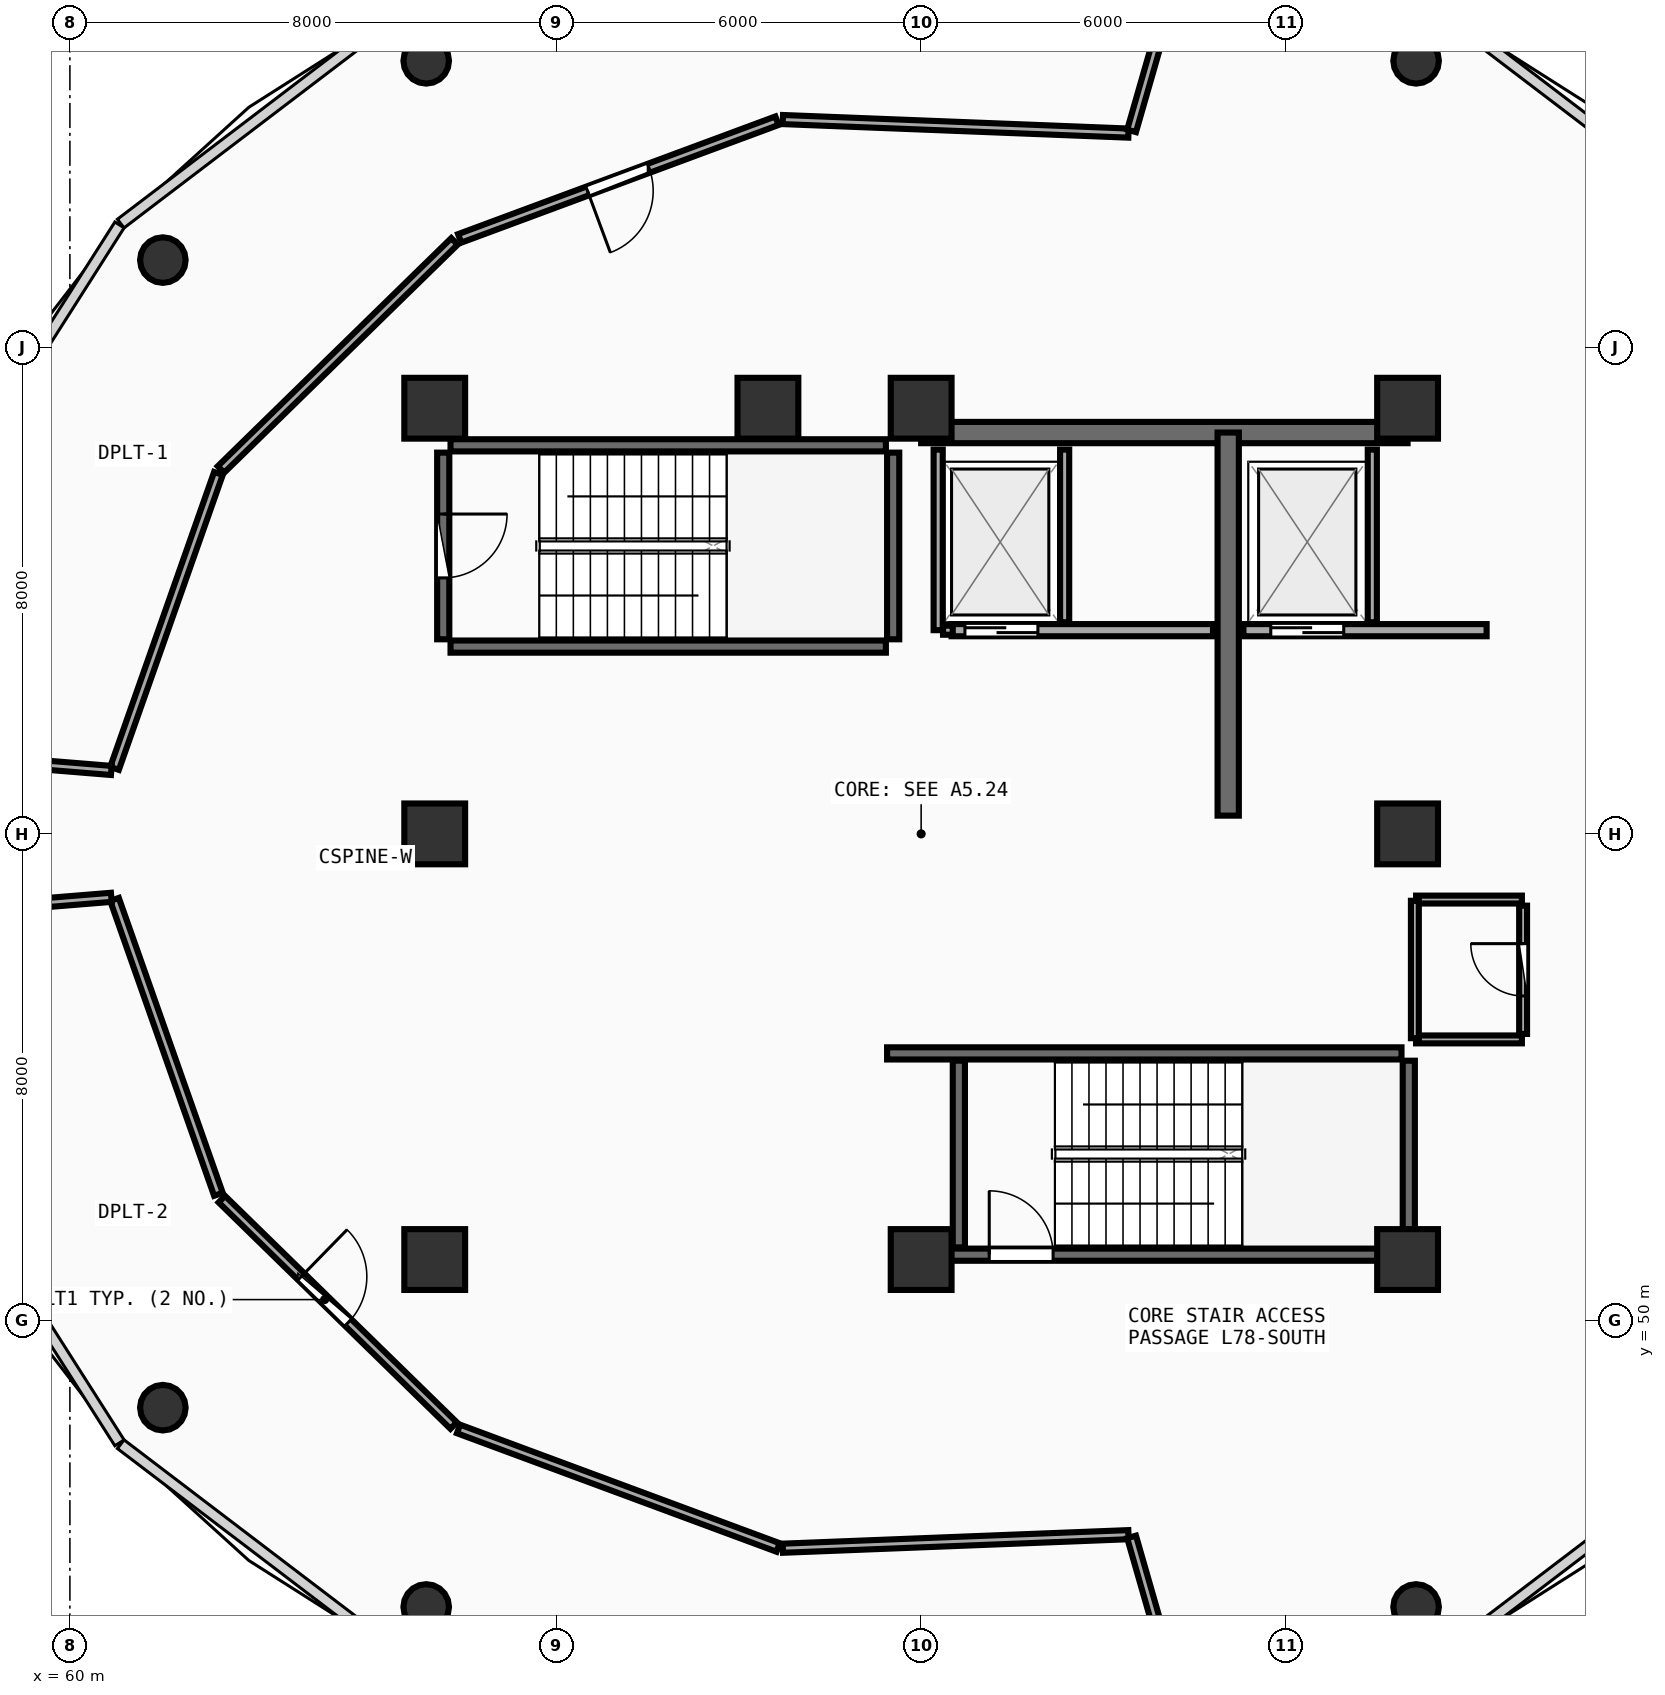
"""IFC4 building model, lengths in metres.
Left out: names, types, materials, properties, quantities, classifications, styles, units other than length and angle.
Written with IfcOpenShell. Run it as: python <this file> out.ifc"""

import sys

from ifc_helpers import new_model, si_unit, direction, frame, frame_2d, origin, origin_2d, place, context, subcontext, project, spatial, rectangle, circle, extrude, element, fill, save


model = new_model("IFC4")
c1 = context("Model", 3, precision=1e-05, world=origin(), true_north=direction((0.0, 1.0)))
c2 = subcontext(c1, "Body", "Model", "MODEL_VIEW")
j1 = project(units=[si_unit("LENGTHUNIT", "METRE"), si_unit("PLANEANGLEUNIT", "RADIAN")], contexts=[c1])
p1 = place(None, origin())
s1 = spatial("IfcSite", under=j1, at=p1, CompositionType="ELEMENT")
p2 = place(p1, origin())
s2 = spatial("IfcBuilding", under=s1, at=p2, CompositionType="ELEMENT")
p3 = place(p2, frame((0.0, 0.0, 306.9)))
s3 = spatial("IfcBuildingStorey", under=s2, at=p3, CompositionType="ELEMENT", Elevation=306.9)
for number, where, z_axis, x_axis in (
    (1, (66.0, 51.0, 0.0), (0.0, 0.0, 1.0), (1.0, 0.0, 0.0)),
    (2, (74.0, 51.0, 0.0), (0.0, 0.0, 1.0), (1.0, 0.0, 0.0)),
    (3, (82.0, 51.0, 0.0), (0.0, 0.0, 1.0), (1.0, 0.0, 0.0)),
    (4, (82.0, 58.0, 0.0), (0.0, 0.0, 1.0), (1.0, 0.0, 0.0)),
    (5, (82.0, 65.0, 0.0), (0.0, 0.0, 1.0), (1.0, 0.0, 0.0)),
    (6, (74.0, 65.0, 0.0), (0.0, 0.0, 1.0), (1.0, 0.0, 0.0)),
    (7, (71.48, 65.0, 0.0), (0.0, 0.0, 1.0), (1.0, 0.0, 0.0)),
    (8, (66.0, 65.0, 0.0), (0.0, 0.0, 1.0), (1.0, 0.0, 0.0)),
    (9, (66.0, 58.0, 0.0), (0.0, 0.0, 1.0), (1.0, 0.0, 0.0)),
):
    element("IfcColumn", number, at=place(p3, frame(where, z_axis=z_axis, x_axis=x_axis)), inside=s3, PredefinedType="PILASTER", context=c2, shape_type="SweptSolid", body=[
        extrude(rectangle(XDim=1.0, YDim=1.0, at=origin_2d()), origin(), (0.0, 0.0, 1.0), 4.2),
    ])
for number, where, z_axis, x_axis in (
    (10, (82.14, 70.713, 0.0), (0.0, 0.0, 1.0), (1.0, 0.0, 0.0)),
    (11, (65.86, 70.713, 0.0), (0.0, 0.0, 1.0), (1.0, 0.0, 0.0)),
    (12, (61.529, 67.436, 0.0), (0.0, 0.0, 1.0), (1.0, 0.0, 0.0)),
    (13, (61.529, 48.564, 0.0), (0.0, 0.0, 1.0), (1.0, 0.0, 0.0)),
    (14, (65.86, 45.287, 0.0), (0.0, 0.0, 1.0), (1.0, 0.0, 0.0)),
    (15, (82.14, 45.287, 0.0), (0.0, 0.0, 1.0), (1.0, 0.0, 0.0)),
):
    element("IfcColumn", number, at=place(p3, frame(where, z_axis=z_axis, x_axis=x_axis)), inside=s3, PredefinedType="COLUMN", context=c2, shape_type="SweptSolid", body=[
        extrude(circle(Radius=0.375, at=origin_2d()), origin(), (0.0, 0.0, 1.0), 4.2),
    ])
p4 = place(p3, frame((66.26, 61.08, 0.0), z_axis=(0.0, 0.0, 1.0), x_axis=(1.0, 0.0, 0.0)))
e16 = element("IfcWall", 16, at=p4, inside=s3, PredefinedType="SHEAR", context=c2, shape_type="SweptSolid", body=[
    extrude(rectangle(XDim=7.16, YDim=0.2, at=frame_2d((3.58, 0.0))), origin(), (0.0, 0.0, 1.0), 3.92),
])
p5 = place(p3, frame((73.54, 61.2, 0.0), z_axis=(0.0, 0.0, 1.0), x_axis=(0.0, 1.0, 0.0)))
e17 = element("IfcWall", 17, at=p5, inside=s3, PredefinedType="SHEAR", context=c2, shape_type="SweptSolid", body=[
    extrude(rectangle(XDim=3.07, YDim=0.2, at=frame_2d((1.535, 0.0))), origin(), (0.0, 0.0, 1.0), 3.92),
])
p6 = place(p3, frame((73.42, 64.39, 0.0), z_axis=(0.0, 0.0, 1.0), x_axis=(-1.0, 0.0, 0.0)))
e18 = element("IfcWall", 18, at=p6, inside=s3, PredefinedType="SHEAR", context=c2, shape_type="SweptSolid", body=[
    extrude(rectangle(XDim=7.16, YDim=0.2, at=frame_2d((3.58, 0.0))), origin(), (0.0, 0.0, 1.0), 3.92),
])
p7 = place(p3, frame((66.14, 64.27, 0.0), z_axis=(0.0, 0.0, 1.0), x_axis=(0.0, -1.0, 0.0)))
e19 = element("IfcWall", 19, at=p7, inside=s3, PredefinedType="SHEAR", context=c2, shape_type="SweptSolid", body=[
    extrude(rectangle(XDim=3.07, YDim=0.2, at=frame_2d((1.535, 0.0))), origin(), (0.0, 0.0, 1.0), 3.92),
])
p8 = place(p7, frame((1.01, 0.0, 0.0)))
e20 = element("IfcOpeningElement", 20, at=p8, cuts=e19, PredefinedType="OPENING", context=c2, shape_type="SweptSolid", body=[
    extrude(rectangle(XDim=1.05, YDim=2.1, at=frame_2d((0.525, 1.05))), frame((0.0, 0.11, 0.0), z_axis=(0.0, -1.0, 0.0), x_axis=(1.0, 0.0, 0.0)), (0.0, 0.0, 1.0), 0.22),
])
p9 = place(p3, frame((74.0, 51.08, 0.0), z_axis=(0.0, 0.0, 1.0), x_axis=(1.0, 0.0, 0.0)))
e21 = element("IfcWall", 21, at=p9, inside=s3, PredefinedType="SHEAR", context=c2, shape_type="SweptSolid", body=[
    extrude(rectangle(XDim=7.9, YDim=0.2, at=frame_2d((3.95, 0.0))), origin(), (0.0, 0.0, 1.0), 3.92),
])
p10 = place(p9, frame((1.12, 0.0, 0.0)))
e22 = element("IfcOpeningElement", 22, at=p10, cuts=e21, PredefinedType="OPENING", context=c2, shape_type="SweptSolid", body=[
    extrude(rectangle(XDim=1.05, YDim=2.1, at=frame_2d((0.525, 1.05))), frame((0.0, 0.11, 0.0), z_axis=(0.0, -1.0, 0.0), x_axis=(1.0, 0.0, 0.0)), (0.0, 0.0, 1.0), 0.22),
])
p11 = place(p3, frame((82.02, 51.2, 0.0), z_axis=(0.0, 0.0, 1.0), x_axis=(0.0, 1.0, 0.0)))
e23 = element("IfcWall", 23, at=p11, inside=s3, PredefinedType="SHEAR", context=c2, shape_type="SweptSolid", body=[
    extrude(rectangle(XDim=3.07, YDim=0.2, at=frame_2d((1.535, 0.0))), origin(), (0.0, 0.0, 1.0), 3.92),
])
p12 = place(p3, frame((81.9, 54.39, 0.0), z_axis=(0.0, 0.0, 1.0), x_axis=(-1.0, 0.0, 0.0)))
e24 = element("IfcWall", 24, at=p12, inside=s3, PredefinedType="SHEAR", context=c2, shape_type="SweptSolid", body=[
    extrude(rectangle(XDim=8.46, YDim=0.2, at=frame_2d((4.23, 0.0))), origin(), (0.0, 0.0, 1.0), 3.92),
])
p13 = place(p3, frame((74.62, 54.27, 0.0), z_axis=(0.0, 0.0, 1.0), x_axis=(0.0, -1.0, 0.0)))
e25 = element("IfcWall", 25, at=p13, inside=s3, PredefinedType="SHEAR", context=c2, shape_type="SweptSolid", body=[
    extrude(rectangle(XDim=3.07, YDim=0.2, at=frame_2d((1.535, 0.0))), origin(), (0.0, 0.0, 1.0), 3.92),
])
p14 = place(p3, frame((74.0, 64.6, 0.0), z_axis=(0.0, 0.0, 1.0), x_axis=(1.0, 0.0, 0.0)))
e26 = element("IfcWall", 26, at=p14, inside=s3, PredefinedType="SHEAR", context=c2, shape_type="SweptSolid", body=[
    extrude(rectangle(XDim=8.0, YDim=0.35, at=frame_2d((4.0, 0.0))), origin(), (0.0, 0.0, 1.0), 3.98),
])
p15 = place(p3, frame((79.05, 58.3, 0.0), z_axis=(0.0, 0.0, 1.0), x_axis=(0.0, 1.0, 0.0)))
e27 = element("IfcWall", 27, at=p15, inside=s3, PredefinedType="SHEAR", context=c2, shape_type="SweptSolid", body=[
    extrude(rectangle(XDim=6.3, YDim=0.35, at=frame_2d((3.15, 0.0))), origin(), (0.0, 0.0, 1.0), 3.98),
])
p16 = place(p3, frame((74.5, 61.35, 0.0), z_axis=(0.0, 0.0, 1.0), x_axis=(1.0, 0.0, 0.0)))
e28 = element("IfcWall", 28, at=p16, inside=s3, PredefinedType="SOLIDWALL", context=c2, shape_type="SweptSolid", body=[
    extrude(rectangle(XDim=4.3, YDim=0.2, at=frame_2d((2.15, 0.0))), origin(), (0.0, 0.0, 1.0), 3.97),
])
p17 = place(p16, frame((0.22, 0.0, 0.0)))
e29 = element("IfcOpeningElement", 29, at=p17, cuts=e28, PredefinedType="OPENING", context=c2, shape_type="SweptSolid", body=[
    extrude(rectangle(XDim=1.2, YDim=2.15, at=frame_2d((0.6, 1.075))), frame((0.0, 0.11, 0.0), z_axis=(0.0, -1.0, 0.0), x_axis=(1.0, 0.0, 0.0)), (0.0, 0.0, 1.0), 0.22),
])
p18 = place(p3, frame((74.28, 61.35, 0.0), z_axis=(0.0, 0.0, 1.0), x_axis=(0.0, 1.0, 0.0)))
e30 = element("IfcWall", 30, at=p18, inside=s3, PredefinedType="PARTITIONING", context=c2, shape_type="SweptSolid", body=[
    extrude(rectangle(XDim=2.97, YDim=0.15, at=frame_2d((1.485, 0.0))), origin(), (0.0, 0.0, 1.0), 1.365),
])
p19 = place(p3, frame((74.36, 61.35, 0.0), z_axis=(0.0, 0.0, 1.0), x_axis=(1.0, 0.0, 0.0)))
e31 = element("IfcWall", 31, at=p19, inside=s3, PredefinedType="PARTITIONING", context=c2, shape_type="SweptSolid", body=[
    extrude(rectangle(XDim=0.16, YDim=0.15, at=frame_2d((0.08, 0.0))), origin(), (0.0, 0.0, 1.0), 1.365),
])
p20 = place(p3, frame((76.36, 61.48, 0.0), z_axis=(0.0, 0.0, 1.0), x_axis=(0.0, 1.0, 0.0)))
e32 = element("IfcWall", 32, at=p20, inside=s3, PredefinedType="PARTITIONING", context=c2, shape_type="SweptSolid", body=[
    extrude(rectangle(XDim=2.84, YDim=0.15, at=frame_2d((1.42, 0.0))), origin(), (0.0, 0.0, 1.0), 3.97),
])
p21 = place(p3, frame((79.3, 61.35, 0.0), z_axis=(0.0, 0.0, 1.0), x_axis=(1.0, 0.0, 0.0)))
e33 = element("IfcWall", 33, at=p21, inside=s3, PredefinedType="SOLIDWALL", context=c2, shape_type="SweptSolid", body=[
    extrude(rectangle(XDim=4.0, YDim=0.2, at=frame_2d((2.0, 0.0))), origin(), (0.0, 0.0, 1.0), 3.265),
])
p22 = place(p21, frame((0.45, 0.0, 0.0)))
e34 = element("IfcOpeningElement", 34, at=p22, cuts=e33, PredefinedType="OPENING", context=c2, shape_type="SweptSolid", body=[
    extrude(rectangle(XDim=1.2, YDim=2.15, at=frame_2d((0.6, 1.075))), frame((0.0, 0.11, 0.0), z_axis=(0.0, -1.0, 0.0), x_axis=(1.0, 0.0, 0.0)), (0.0, 0.0, 1.0), 0.22),
])
p23 = place(p3, frame((81.42, 61.48, 0.0), z_axis=(0.0, 0.0, 1.0), x_axis=(0.0, 1.0, 0.0)))
e35 = element("IfcWall", 35, at=p23, inside=s3, PredefinedType="PARTITIONING", context=c2, shape_type="SweptSolid", body=[
    extrude(rectangle(XDim=2.84, YDim=0.15, at=frame_2d((1.42, 0.0))), origin(), (0.0, 0.0, 1.0), 3.97),
])
p24 = place(p3, frame((71.629, 69.728, 0.0), z_axis=(0.0, 0.0, 1.0), x_axis=(-0.937610047719, -0.34768865155, 0.0)))
e36 = element("IfcWall", 36, at=p24, inside=s3, PredefinedType="PARTITIONING", context=c2, shape_type="SweptSolid", body=[
    extrude(rectangle(XDim=5.565, YDim=0.15, at=frame_2d((2.783, 0.0))), origin(), (0.0, 0.0, 1.0), 3.565),
])
p25 = place(p24, frame((2.243, 0.0, 0.0)))
e37 = element("IfcOpeningElement", 37, at=p25, cuts=e36, PredefinedType="OPENING", context=c2, shape_type="SweptSolid", body=[
    extrude(rectangle(XDim=1.08, YDim=2.1, at=frame_2d((0.54, 1.05))), frame((0.0, 0.085, 0.0), z_axis=(0.0, -1.0, 0.0), x_axis=(1.0, 0.0, 0.0)), (0.0, 0.0, 1.0), 0.17),
])
p26 = place(p3, frame((62.499, 51.993, 0.0), z_axis=(0.0, 0.0, 1.0), x_axis=(0.71541878573, -0.698695900249, 0.0)))
e38 = element("IfcWall", 38, at=p26, inside=s3, PredefinedType="PARTITIONING", context=c2, shape_type="SweptSolid", body=[
    extrude(rectangle(XDim=5.329, YDim=0.15, at=frame_2d((2.664, 0.0))), origin(), (0.0, 0.0, 1.0), 3.565),
])
p27 = place(p26, frame((1.824, 0.0, 0.0)))
e39 = element("IfcOpeningElement", 39, at=p27, cuts=e38, PredefinedType="OPENING", context=c2, shape_type="SweptSolid", body=[
    extrude(rectangle(XDim=1.08, YDim=2.1, at=frame_2d((0.54, 1.05))), frame((0.0, 0.085, 0.0), z_axis=(0.0, -1.0, 0.0), x_axis=(1.0, 0.0, 0.0)), (0.0, 0.0, 1.0), 0.17),
])
p28 = place(p3, frame((83.9, 54.71, 0.0), z_axis=(0.0, 0.0, 1.0), x_axis=(0.0, 1.0, 0.0)))
e40 = element("IfcWall", 40, at=p28, inside=s3, PredefinedType="PLUMBINGWALL", context=c2, shape_type="SweptSolid", body=[
    extrude(rectangle(XDim=2.11, YDim=0.13, at=frame_2d((1.055, 0.0))), origin(), (0.0, 0.0, 1.0), 3.97),
])
p29 = place(p28, frame((0.625, 0.0, 0.0)))
e41 = element("IfcOpeningElement", 41, at=p29, cuts=e40, PredefinedType="OPENING", context=c2, shape_type="SweptSolid", body=[
    extrude(rectangle(XDim=0.86, YDim=2.05, at=frame_2d((0.43, 1.025))), frame((0.0, 0.075, 0.0), z_axis=(0.0, -1.0, 0.0), x_axis=(1.0, 0.0, 0.0)), (0.0, 0.0, 1.0), 0.15),
])
p30 = place(p3, frame((77.41, 69.525, 0.0), z_axis=(0.0, 0.0, 1.0), x_axis=(-0.999233860457, 0.03913683834, 0.0)))
e42 = element("IfcWall", 42, at=p30, inside=s3, PredefinedType="PARTITIONING", context=c2, shape_type="SweptSolid", body=[
    extrude(rectangle(XDim=5.689, YDim=0.15, at=frame_2d((2.845, 0.0))), origin(), (0.0, 0.0, 1.0), 3.565),
])
p31 = place(p3, frame((66.325, 67.744, 0.0), z_axis=(0.0, 0.0, 1.0), x_axis=(-0.715402081333, -0.698713004047, 0.0)))
e43 = element("IfcWall", 43, at=p31, inside=s3, PredefinedType="PARTITIONING", context=c2, shape_type="SweptSolid", body=[
    extrude(rectangle(XDim=5.369, YDim=0.15, at=frame_2d((2.684, 0.0))), origin(), (0.0, 0.0, 1.0), 3.565),
])
p32 = place(p3, frame((62.443, 63.927, 0.0), z_axis=(0.0, 0.0, 1.0), x_axis=(-0.332236382146, -0.943196154773, 0.0)))
e44 = element("IfcWall", 44, at=p32, inside=s3, PredefinedType="PARTITIONING", context=c2, shape_type="SweptSolid", body=[
    extrude(rectangle(XDim=5.142, YDim=0.15, at=frame_2d((2.571, 0.0))), origin(), (0.0, 0.0, 1.0), 3.565),
])
p33 = place(p3, frame((60.681, 59.043, 0.0), z_axis=(0.0, 0.0, 1.0), x_axis=(-0.996696214814, 0.081219796696, 0.0)))
e45 = element("IfcWall", 45, at=p33, inside=s3, PredefinedType="PARTITIONING", context=c2, shape_type="SweptSolid", body=[
    extrude(rectangle(XDim=2.889, YDim=0.15, at=frame_2d((1.444, 0.0))), origin(), (0.0, 0.0, 1.0), 3.565),
])
p34 = place(p3, frame((78.208, 72.161, 0.0), z_axis=(0.0, 0.0, 1.0), x_axis=(-0.276223004297, -0.961093570833, 0.0)))
e46 = element("IfcWall", 46, at=p34, inside=s3, PredefinedType="PARTITIONING", context=c2, shape_type="SweptSolid", body=[
    extrude(rectangle(XDim=2.705, YDim=0.15, at=frame_2d((1.352, 0.0))), origin(), (0.0, 0.0, 1.0), 3.565),
])
p35 = place(p3, frame((60.734, 56.922, 0.0), z_axis=(0.0, 0.0, 1.0), x_axis=(0.332236382146, -0.943196154773, 0.0)))
e47 = element("IfcWall", 47, at=p35, inside=s3, PredefinedType="PARTITIONING", context=c2, shape_type="SweptSolid", body=[
    extrude(rectangle(XDim=5.142, YDim=0.15, at=frame_2d((2.571, 0.0))), origin(), (0.0, 0.0, 1.0), 3.565),
])
p36 = place(p3, frame((66.392, 48.214, 0.0), z_axis=(0.0, 0.0, 1.0), x_axis=(0.937597367655, -0.347722843894, 0.0)))
e48 = element("IfcWall", 48, at=p36, inside=s3, PredefinedType="PARTITIONING", context=c2, shape_type="SweptSolid", body=[
    extrude(rectangle(XDim=5.606, YDim=0.15, at=frame_2d((2.803, 0.0))), origin(), (0.0, 0.0, 1.0), 3.665),
])
p37 = place(p3, frame((71.725, 46.253, 0.0), z_axis=(0.0, 0.0, 1.0), x_axis=(0.999233860457, 0.03913683834, 0.0)))
e49 = element("IfcWall", 49, at=p37, inside=s3, PredefinedType="PARTITIONING", context=c2, shape_type="SweptSolid", body=[
    extrude(rectangle(XDim=5.689, YDim=0.15, at=frame_2d((2.845, 0.0))), origin(), (0.0, 0.0, 1.0), 3.565),
])
p38 = place(p3, frame((77.461, 46.439, 0.0), z_axis=(0.0, 0.0, 1.0), x_axis=(0.276223004297, -0.961093570833, 0.0)))
e50 = element("IfcWall", 50, at=p38, inside=s3, PredefinedType="PARTITIONING", context=c2, shape_type="SweptSolid", body=[
    extrude(rectangle(XDim=2.705, YDim=0.15, at=frame_2d((1.352, 0.0))), origin(), (0.0, 0.0, 1.0), 3.565),
])
p39 = place(p3, frame((57.802, 56.722, 0.0), z_axis=(0.0, 0.0, 1.0), x_axis=(0.996696214814, 0.081219796696, 0.0)))
e51 = element("IfcWall", 51, at=p39, inside=s3, PredefinedType="PARTITIONING", context=c2, shape_type="SweptSolid", body=[
    extrude(rectangle(XDim=2.889, YDim=0.15, at=frame_2d((1.444, 0.0))), origin(), (0.0, 0.0, 1.0), 3.565),
])
for number, where, z_axis, x_axis in (
    (52, (82.14, 54.62, 0.0), (0.0, 0.0, 1.0), (1.0, 0.0, 0.0)),
    (53, (83.88, 56.92, 0.0), (0.0, 0.0, 1.0), (-1.0, 0.0, 0.0)),
):
    element("IfcWall", number, at=place(p3, frame(where, z_axis=z_axis, x_axis=x_axis)), inside=s3, PredefinedType="PLUMBINGWALL", context=c2, shape_type="SweptSolid", body=[
        extrude(rectangle(XDim=1.74, YDim=0.13, at=frame_2d((0.87, 0.0))), origin(), (0.0, 0.0, 1.0), 3.265),
    ])
p40 = place(p3, frame((82.12, 56.9, 0.0), z_axis=(0.0, 0.0, 1.0), x_axis=(0.0, -1.0, 0.0)))
e54 = element("IfcWall", 54, at=p40, inside=s3, PredefinedType="PLUMBINGWALL", context=c2, shape_type="SweptSolid", body=[
    extrude(rectangle(XDim=2.26, YDim=0.13, at=frame_2d((1.13, 0.0))), origin(), (0.0, 0.0, 1.0), 3.265),
])
p41 = place(p8, origin())
e55 = element("IfcDoor", 55, at=p41, inside=s3, OperationType="SINGLE_SWING_LEFT", PredefinedType="DOOR", context=c2, shape_type="SweptSolid", body=[
    extrude(rectangle(XDim=1.05, YDim=2.1, at=frame_2d((0.525, 1.05))), frame((0.0, 0.025, 0.0), z_axis=(0.0, -1.0, 0.0), x_axis=(1.0, 0.0, 0.0)), (0.0, 0.0, 1.0), 0.05),
])
fill(e20, e55)
p42 = place(p10, origin())
e56 = element("IfcDoor", 56, at=p42, inside=s3, OperationType="SINGLE_SWING_LEFT", PredefinedType="DOOR", context=c2, shape_type="SweptSolid", body=[
    extrude(rectangle(XDim=1.05, YDim=2.1, at=frame_2d((0.525, 1.05))), frame((0.0, 0.025, 0.0), z_axis=(0.0, -1.0, 0.0), x_axis=(1.0, 0.0, 0.0)), (0.0, 0.0, 1.0), 0.05),
])
fill(e22, e56)
p43 = place(p17, origin())
e57 = element("IfcDoor", 57, at=p43, inside=s3, OperationType="DOUBLE_DOOR_SLIDING", PredefinedType="DOOR", context=c2, shape_type="SweptSolid", body=[
    extrude(rectangle(XDim=1.2, YDim=2.15, at=frame_2d((0.6, 1.075))), frame((0.0, 0.025, 0.0), z_axis=(0.0, -1.0, 0.0), x_axis=(1.0, 0.0, 0.0)), (0.0, 0.0, 1.0), 0.05),
])
fill(e29, e57)
p44 = place(p22, origin())
e58 = element("IfcDoor", 58, at=p44, inside=s3, OperationType="DOUBLE_DOOR_SLIDING", PredefinedType="DOOR", context=c2, shape_type="SweptSolid", body=[
    extrude(rectangle(XDim=1.2, YDim=2.15, at=frame_2d((0.6, 1.075))), frame((0.0, 0.025, 0.0), z_axis=(0.0, -1.0, 0.0), x_axis=(1.0, 0.0, 0.0)), (0.0, 0.0, 1.0), 0.05),
])
fill(e34, e58)
p45 = place(p25, origin())
e59 = element("IfcDoor", 59, at=p45, inside=s3, OperationType="SINGLE_SWING_RIGHT", PredefinedType="DOOR", context=c2, shape_type="SweptSolid", body=[
    extrude(rectangle(XDim=1.08, YDim=2.1, at=frame_2d((0.54, 1.05))), frame((0.0, 0.025, 0.0), z_axis=(0.0, -1.0, 0.0), x_axis=(1.0, 0.0, 0.0)), (0.0, 0.0, 1.0), 0.05),
])
fill(e37, e59)
p46 = place(p27, origin())
e60 = element("IfcDoor", 60, at=p46, inside=s3, OperationType="SINGLE_SWING_LEFT", PredefinedType="DOOR", context=c2, shape_type="SweptSolid", body=[
    extrude(rectangle(XDim=1.08, YDim=2.1, at=frame_2d((0.54, 1.05))), frame((0.0, 0.025, 0.0), z_axis=(0.0, -1.0, 0.0), x_axis=(1.0, 0.0, 0.0)), (0.0, 0.0, 1.0), 0.05),
])
fill(e39, e60)
p47 = place(p29, origin())
e61 = element("IfcDoor", 61, at=p47, inside=s3, OperationType="SINGLE_SWING_RIGHT", PredefinedType="DOOR", context=c2, shape_type="SweptSolid", body=[
    extrude(rectangle(XDim=0.86, YDim=2.05, at=frame_2d((0.43, 1.025))), frame((0.0, 0.025, 0.0), z_axis=(0.0, -1.0, 0.0), x_axis=(1.0, 0.0, 0.0)), (0.0, 0.0, 1.0), 0.05),
])
fill(e41, e61)
save(model, sys.argv[1])
